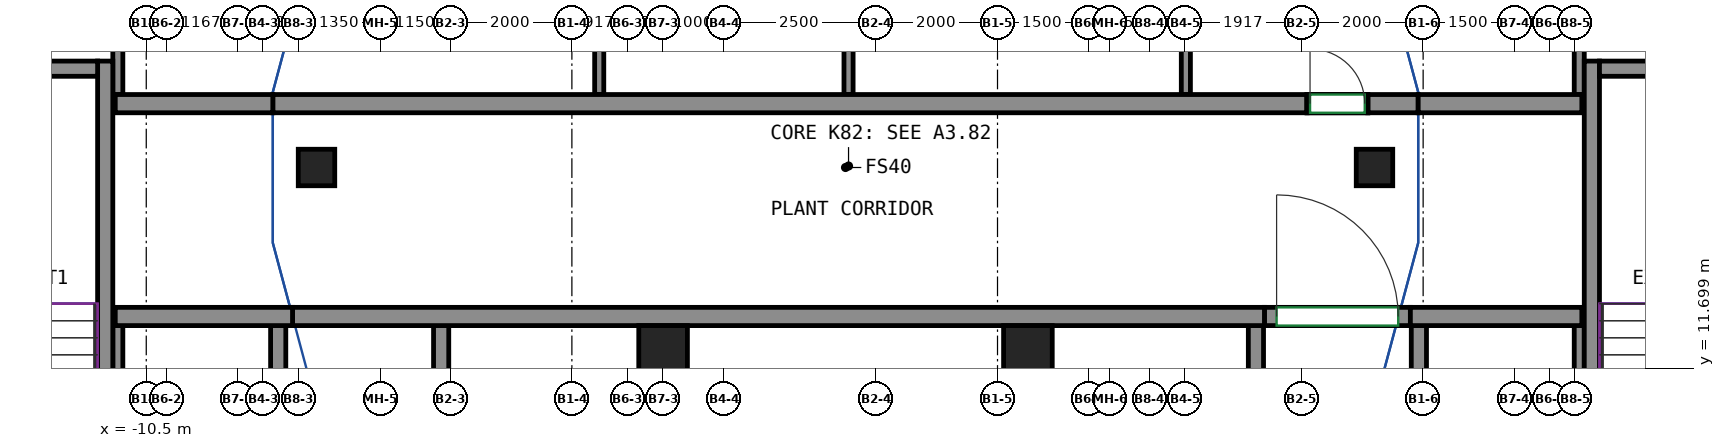
"""IFC4 building model, lengths in metres.
Left out: names, types, materials, properties, quantities, classifications, styles, units other than length and angle.
Written with IfcOpenShell. Run it as: python <this file> out.ifc"""

import sys

from ifc_helpers import new_model, si_unit, direction, frame, frame_2d, origin, origin_2d, place, context, subcontext, project, spatial, rectangle, extrude, source, transform, mapped, element, fill, save


model = new_model("IFC4")
c1 = context("Model", 3, precision=1e-05, world=origin(), true_north=direction((0.0, 1.0)))
c2 = subcontext(c1, "Body", "Model", "MODEL_VIEW")
j1 = project(units=[si_unit("LENGTHUNIT", "METRE"), si_unit("PLANEANGLEUNIT", "RADIAN")], contexts=[c1])
p1 = place(None, origin())
s1 = spatial("IfcSite", under=j1, at=p1, CompositionType="ELEMENT")
p2 = place(p1, origin())
s2 = spatial("IfcBuilding", under=s1, at=p2, CompositionType="ELEMENT")
p3 = place(p2, frame((0.0, 0.0, 323.8)))
s3 = spatial("IfcBuildingStorey", under=s2, at=p3, CompositionType="ELEMENT", Elevation=323.8)
m1 = source(origin(), c2, "Body", "SweptSolid", [
    extrude(rectangle(XDim=0.6, YDim=0.6, at=origin_2d()), origin(), (0.0, 0.0, 1.0), 4.6),
])
for number, where, z_axis, x_axis in (
    (1, (9.7, 15.0, 0.0), (0.0, 0.0, 1.0), (1.0, 0.0, 0.0)),
    (2, (-7.7, 15.0, 0.0), (0.0, 0.0, 1.0), (1.0, 0.0, 0.0)),
):
    element("IfcColumn", number, at=place(p3, frame(where, z_axis=z_axis, x_axis=x_axis)), inside=s3, PredefinedType="COLUMN", context=c2, shape_type="MappedRepresentation", body=[
        mapped(m1, transform((0.0, 0.0, 0.0))),
    ])
m2 = source(origin(), c2, "Body", "SweptSolid", [
    extrude(rectangle(XDim=0.8, YDim=0.8, at=origin_2d()), origin(), (0.0, 0.0, 1.0), 4.6),
])
for number, where, z_axis, x_axis in (
    (3, (-2.0, 12.0, 0.0), (0.0, 0.0, 1.0), (1.0, 0.0, 0.0)),
    (4, (4.0, 12.0, 0.0), (0.0, 0.0, 1.0), (1.0, 0.0, 0.0)),
):
    element("IfcColumn", number, at=place(p3, frame(where, z_axis=z_axis, x_axis=x_axis)), inside=s3, PredefinedType="COLUMN", context=c2, shape_type="MappedRepresentation", body=[
        mapped(m2, transform((0.0, 0.0, 0.0))),
    ])
m3 = source(origin(), c2, "Body", "SweptSolid", [
    extrude(rectangle(XDim=7.75, YDim=0.25, at=frame_2d((3.875, 0.0))), origin(), (0.0, 0.0, 1.0), 5.0),
])
p4 = place(p3, frame((-11.175, 9.0, -0.4), z_axis=(0.0, 0.0, 1.0), x_axis=(0.0, 1.0, 0.0)))
e5 = element("IfcWall", 5, at=p4, inside=s3, PredefinedType="SHEAR", context=c2, shape_type="MappedRepresentation", body=[
    mapped(m3, transform((0.0, 0.0, 0.0))),
])
m4 = source(origin(), c2, "Body", "SweptSolid", [
    extrude(rectangle(XDim=3.7, YDim=0.25, at=frame_2d((1.85, 0.0))), origin(), (0.0, 0.0, 1.0), 5.0),
])
p5 = place(p3, frame((-15.0, 16.625, -0.4), z_axis=(0.0, 0.0, 1.0), x_axis=(1.0, 0.0, 0.0)))
e6 = element("IfcWall", 6, at=p5, inside=s3, PredefinedType="SHEAR", context=c2, shape_type="MappedRepresentation", body=[
    mapped(m4, transform((0.0, 0.0, 0.0))),
])
p6 = place(p3, frame((13.275, 9.0, -0.4), z_axis=(0.0, 0.0, 1.0), x_axis=(0.0, 1.0, 0.0)))
e7 = element("IfcWall", 7, at=p6, inside=s3, PredefinedType="SHEAR", context=c2, shape_type="MappedRepresentation", body=[
    mapped(m3, transform((0.0, 0.0, 0.0))),
])
m5 = source(origin(), c2, "Body", "SweptSolid", [
    extrude(rectangle(XDim=3.7, YDim=0.25, at=frame_2d((1.85, 0.0))), origin(), (0.0, 0.0, 1.0), 5.0),
])
p7 = place(p3, frame((13.4, 16.625, -0.4), z_axis=(0.0, 0.0, 1.0), x_axis=(1.0, 0.0, 0.0)))
e8 = element("IfcWall", 8, at=p7, inside=s3, PredefinedType="SHEAR", context=c2, shape_type="MappedRepresentation", body=[
    mapped(m5, transform((0.0, 0.0, 0.0))),
])
m6 = source(origin(), c2, "Body", "SweptSolid", [
    extrude(rectangle(XDim=15.984, YDim=0.3, at=frame_2d((7.992, 0.0))), origin(), (0.0, 0.0, 1.0), 4.6),
])
p8 = place(p3, frame((-8.094, 12.55, 0.0), z_axis=(0.0, 0.0, 1.0), x_axis=(1.0, 0.0, 0.0)))
e9 = element("IfcWall", 9, at=p8, inside=s3, PredefinedType="SHEAR", context=c2, shape_type="MappedRepresentation", body=[
    mapped(m6, transform((0.0, 0.0, 0.0))),
])
m7 = source(origin(), c2, "Body", "SweptSolid", [
    extrude(rectangle(XDim=2.916, YDim=0.3, at=frame_2d((1.458, 0.0))), origin(), (0.0, 0.0, 1.0), 5.0),
])
p9 = place(p3, frame((-11.01, 12.55, -0.4), z_axis=(0.0, 0.0, 1.0), x_axis=(1.0, 0.0, 0.0)))
e10 = element("IfcWall", 10, at=p9, inside=s3, PredefinedType="SHEAR", context=c2, shape_type="MappedRepresentation", body=[
    mapped(m7, transform((0.0, 0.0, 0.0))),
])
m8 = source(origin(), c2, "Body", "SweptSolid", [
    extrude(rectangle(XDim=2.82, YDim=0.3, at=frame_2d((1.41, 0.0))), origin(), (0.0, 0.0, 1.0), 5.0),
])
p10 = place(p3, frame((10.29, 12.55, -0.4), z_axis=(0.0, 0.0, 1.0), x_axis=(1.0, 0.0, 0.0)))
e11 = element("IfcWall", 11, at=p10, inside=s3, PredefinedType="SHEAR", context=c2, shape_type="MappedRepresentation", body=[
    mapped(m8, transform((0.0, 0.0, 0.0))),
])
m9 = source(origin(), c2, "Body", "SweptSolid", [
    extrude(rectangle(XDim=17.009, YDim=0.3, at=frame_2d((8.504, 0.0))), origin(), (0.0, 0.0, 1.0), 4.6),
])
p11 = place(p3, frame((-8.419, 16.05, 0.0), z_axis=(0.0, 0.0, 1.0), x_axis=(1.0, 0.0, 0.0)))
e12 = element("IfcWall", 12, at=p11, inside=s3, PredefinedType="SHEAR", context=c2, shape_type="MappedRepresentation", body=[
    mapped(m9, transform((0.0, 0.0, 0.0))),
])
m10 = source(origin(), c2, "Body", "SweptSolid", [
    extrude(rectangle(XDim=2.591, YDim=0.3, at=frame_2d((1.296, 0.0))), origin(), (0.0, 0.0, 1.0), 5.0),
])
p12 = place(p3, frame((-11.01, 16.05, -0.4), z_axis=(0.0, 0.0, 1.0), x_axis=(1.0, 0.0, 0.0)))
e13 = element("IfcWall", 13, at=p12, inside=s3, PredefinedType="SHEAR", context=c2, shape_type="MappedRepresentation", body=[
    mapped(m10, transform((0.0, 0.0, 0.0))),
])
m11 = source(origin(), c2, "Body", "SweptSolid", [
    extrude(rectangle(XDim=0.829, YDim=0.3, at=frame_2d((0.414, 0.0))), origin(), (0.0, 0.0, 1.0), 4.6),
])
p13 = place(p3, frame((9.59, 16.05, 0.0), z_axis=(0.0, 0.0, 1.0), x_axis=(1.0, 0.0, 0.0)))
e14 = element("IfcWall", 14, at=p13, inside=s3, PredefinedType="SHEAR", context=c2, shape_type="MappedRepresentation", body=[
    mapped(m11, transform((0.0, 0.0, 0.0))),
])
m12 = source(origin(), c2, "Body", "SweptSolid", [
    extrude(rectangle(XDim=2.691, YDim=0.3, at=frame_2d((1.346, 0.0))), origin(), (0.0, 0.0, 1.0), 5.0),
])
p14 = place(p3, frame((10.419, 16.05, -0.4), z_axis=(0.0, 0.0, 1.0), x_axis=(1.0, 0.0, 0.0)))
e15 = element("IfcWall", 15, at=p14, inside=s3, PredefinedType="SHEAR", context=c2, shape_type="MappedRepresentation", body=[
    mapped(m12, transform((0.0, 0.0, 0.0))),
])
m13 = source(origin(), c2, "Body", "SweptSolid", [
    extrude(rectangle(XDim=1.0, YDim=0.3, at=frame_2d((0.5, 0.0))), origin(), (0.0, 0.0, 1.0), 1.35),
])
p15 = place(p3, frame((8.59, 16.05, 3.25), z_axis=(0.0, 0.0, 1.0), x_axis=(1.0, 0.0, 0.0)))
e16 = element("IfcWall", 16, at=p15, inside=s3, PredefinedType="SHEAR", context=c2, shape_type="MappedRepresentation", body=[
    mapped(m13, transform((0.0, 0.0, 0.0))),
])
m14 = source(origin(), c2, "Body", "SweptSolid", [
    extrude(rectangle(XDim=2.4, YDim=0.3, at=frame_2d((1.2, 0.0))), origin(), (0.0, 0.0, 1.0), 4.6),
])
p16 = place(p3, frame((7.89, 12.55, 0.0), z_axis=(0.0, 0.0, 1.0), x_axis=(1.0, 0.0, 0.0)))
e17 = element("IfcWall", 17, at=p16, inside=s3, PredefinedType="PARTITIONING", context=c2, shape_type="MappedRepresentation", body=[
    mapped(m14, transform((0.0, 0.0, 0.0))),
])
p17 = place(p16, frame((0.2, 0.0, 0.0)))
e18 = element("IfcOpeningElement", 18, at=p17, cuts=e17, PredefinedType="OPENING", context=c2, shape_type="SweptSolid", body=[
    extrude(rectangle(XDim=2.0, YDim=2.1, at=frame_2d((1.0, 1.05))), frame((0.0, 0.16, 0.0), z_axis=(0.0, -1.0, 0.0), x_axis=(1.0, 0.0, 0.0)), (0.0, 0.0, 1.0), 0.32),
])
m15 = source(origin(), c2, "Body", "SweptSolid", [
    extrude(rectangle(XDim=4.8, YDim=0.165, at=frame_2d((2.4, 0.0))), origin(), (0.0, 0.0, 1.0), 4.6),
])
for number, where, z_axis, x_axis in (
    (19, (13.067, 16.2, 0.0), (0.0, 0.0, 1.0), (0.0, 1.0, 0.0)),
    (20, (-10.968, 16.2, 0.0), (0.0, 0.0, 1.0), (0.0, 1.0, 0.0)),
):
    element("IfcWall", number, at=place(p3, frame(where, z_axis=z_axis, x_axis=x_axis)), inside=s3, PredefinedType="PARTITIONING", context=c2, shape_type="MappedRepresentation", body=[
        mapped(m15, transform((0.0, 0.0, 0.0))),
    ])
m16 = source(origin(), c2, "Body", "SweptSolid", [
    extrude(rectangle(XDim=3.4, YDim=0.25, at=frame_2d((1.7, 0.0))), origin(), (0.0, 0.0, 1.0), 4.6),
])
p18 = place(p3, frame((10.43, 9.0, 0.0), z_axis=(0.0, 0.0, 1.0), x_axis=(0.0, 1.0, 0.0)))
e21 = element("IfcWall", 21, at=p18, inside=s3, PredefinedType="PARTITIONING", context=c2, shape_type="MappedRepresentation", body=[
    mapped(m16, transform((0.0, 0.0, 0.0))),
])
m17 = source(origin(), c2, "Body", "SweptSolid", [
    extrude(rectangle(XDim=3.4, YDim=0.165, at=frame_2d((1.7, 0.0))), origin(), (0.0, 0.0, 1.0), 4.6),
])
p19 = place(p3, frame((13.067, 9.0, 0.0), z_axis=(0.0, 0.0, 1.0), x_axis=(0.0, 1.0, 0.0)))
e22 = element("IfcWall", 22, at=p19, inside=s3, PredefinedType="PARTITIONING", context=c2, shape_type="MappedRepresentation", body=[
    mapped(m17, transform((0.0, 0.0, 0.0))),
])
p20 = place(p3, frame((7.75, 9.0, 0.0), z_axis=(0.0, 0.0, 1.0), x_axis=(0.0, 1.0, 0.0)))
e23 = element("IfcWall", 23, at=p20, inside=s3, PredefinedType="PARTITIONING", context=c2, shape_type="MappedRepresentation", body=[
    mapped(m16, transform((0.0, 0.0, 0.0))),
])
p21 = place(p3, frame((-10.968, 9.0, 0.0), z_axis=(0.0, 0.0, 1.0), x_axis=(0.0, 1.0, 0.0)))
e24 = element("IfcWall", 24, at=p21, inside=s3, PredefinedType="PARTITIONING", context=c2, shape_type="MappedRepresentation", body=[
    mapped(m17, transform((0.0, 0.0, 0.0))),
])
for number, where, z_axis, x_axis in (
    (25, (-5.65, 9.0, 0.0), (0.0, 0.0, 1.0), (0.0, 1.0, 0.0)),
    (26, (-8.33, 9.0, 0.0), (0.0, 0.0, 1.0), (0.0, 1.0, 0.0)),
):
    element("IfcWall", number, at=place(p3, frame(where, z_axis=z_axis, x_axis=x_axis)), inside=s3, PredefinedType="PARTITIONING", context=c2, shape_type="MappedRepresentation", body=[
        mapped(m16, transform((0.0, 0.0, 0.0))),
    ])
m18 = source(origin(), c2, "Body", "SweptSolid", [
    extrude(rectangle(XDim=4.8, YDim=0.15, at=frame_2d((2.4, 0.0))), origin(), (0.0, 0.0, 1.0), 4.6),
])
p22 = place(p3, frame((-3.05, 16.2, 0.0), z_axis=(0.0, 0.0, 1.0), x_axis=(0.0, 1.0, 0.0)))
e27 = element("IfcWall", 27, at=p22, inside=s3, PredefinedType="PARTITIONING", context=c2, shape_type="MappedRepresentation", body=[
    mapped(m18, transform((0.0, 0.0, 0.0))),
])
p23 = place(p22, frame((3.55, 0.0, 0.0)))
e28 = element("IfcOpeningElement", 28, at=p23, cuts=e27, PredefinedType="OPENING", context=c2, shape_type="SweptSolid", body=[
    extrude(rectangle(XDim=0.9, YDim=2.1, at=frame_2d((0.45, 1.05))), frame((0.0, 0.085, 0.0), z_axis=(0.0, -1.0, 0.0), x_axis=(1.0, 0.0, 0.0)), (0.0, 0.0, 1.0), 0.17),
])
p24 = place(p3, frame((1.05, 16.2, 0.0), z_axis=(0.0, 0.0, 1.0), x_axis=(0.0, 1.0, 0.0)))
e29 = element("IfcWall", 29, at=p24, inside=s3, PredefinedType="PARTITIONING", context=c2, shape_type="MappedRepresentation", body=[
    mapped(m18, transform((0.0, 0.0, 0.0))),
])
p25 = place(p24, frame((3.55, 0.0, 0.0)))
e30 = element("IfcOpeningElement", 30, at=p25, cuts=e29, PredefinedType="OPENING", context=c2, shape_type="SweptSolid", body=[
    extrude(rectangle(XDim=0.9, YDim=2.1, at=frame_2d((0.45, 1.05))), frame((0.0, 0.085, 0.0), z_axis=(0.0, -1.0, 0.0), x_axis=(1.0, 0.0, 0.0)), (0.0, 0.0, 1.0), 0.17),
])
p26 = place(p3, frame((6.598, 16.2, 0.0), z_axis=(0.0, 0.0, 1.0), x_axis=(0.0, 1.0, 0.0)))
e31 = element("IfcWall", 31, at=p26, inside=s3, PredefinedType="PARTITIONING", context=c2, shape_type="MappedRepresentation", body=[
    mapped(m18, transform((0.0, 0.0, 0.0))),
])
p27 = place(p26, frame((3.55, 0.0, 0.0)))
e32 = element("IfcOpeningElement", 32, at=p27, cuts=e31, PredefinedType="OPENING", context=c2, shape_type="SweptSolid", body=[
    extrude(rectangle(XDim=0.9, YDim=2.1, at=frame_2d((0.45, 1.05))), frame((0.0, 0.085, 0.0), z_axis=(0.0, -1.0, 0.0), x_axis=(1.0, 0.0, 0.0)), (0.0, 0.0, 1.0), 0.17),
])
m19 = source(origin(), c2, "Body", "SweptSolid", [
    extrude(rectangle(XDim=1.0, YDim=0.3, at=frame_2d((0.5, 0.0))), origin(), (0.0, 0.0, 1.0), 2.4),
])
p28 = place(p3, frame((8.59, 16.05, 0.0), z_axis=(0.0, 0.0, 1.0), x_axis=(1.0, 0.0, 0.0)))
e33 = element("IfcWall", 33, at=p28, inside=s3, PredefinedType="PARTITIONING", context=c2, shape_type="MappedRepresentation", body=[
    mapped(m19, transform((0.0, 0.0, 0.0))),
])
p29 = place(p28, frame((0.05, 0.0, 0.0)))
e34 = element("IfcOpeningElement", 34, at=p29, cuts=e33, PredefinedType="OPENING", context=c2, shape_type="SweptSolid", body=[
    extrude(rectangle(XDim=0.9, YDim=2.1, at=frame_2d((0.45, 1.05))), frame((0.0, 0.16, 0.0), z_axis=(0.0, -1.0, 0.0), x_axis=(1.0, 0.0, 0.0)), (0.0, 0.0, 1.0), 0.32),
])
p30 = place(p17, origin())
e35 = element("IfcDoor", 35, at=p30, inside=s3, OperationType="DOUBLE_DOOR_SINGLE_SWING", PredefinedType="DOOR", context=c2, shape_type="SweptSolid", body=[
    extrude(rectangle(XDim=2.0, YDim=2.1, at=frame_2d((1.0, 1.05))), frame((0.0, 0.025, 0.0), z_axis=(0.0, -1.0, 0.0), x_axis=(1.0, 0.0, 0.0)), (0.0, 0.0, 1.0), 0.05),
])
fill(e18, e35)
p31 = place(p29, origin())
e36 = element("IfcDoor", 36, at=p31, inside=s3, OperationType="SINGLE_SWING_LEFT", PredefinedType="DOOR", context=c2, shape_type="SweptSolid", body=[
    extrude(rectangle(XDim=0.9, YDim=2.1, at=frame_2d((0.45, 1.05))), frame((0.0, 0.025, 0.0), z_axis=(0.0, -1.0, 0.0), x_axis=(1.0, 0.0, 0.0)), (0.0, 0.0, 1.0), 0.05),
])
fill(e34, e36)
save(model, sys.argv[1])
